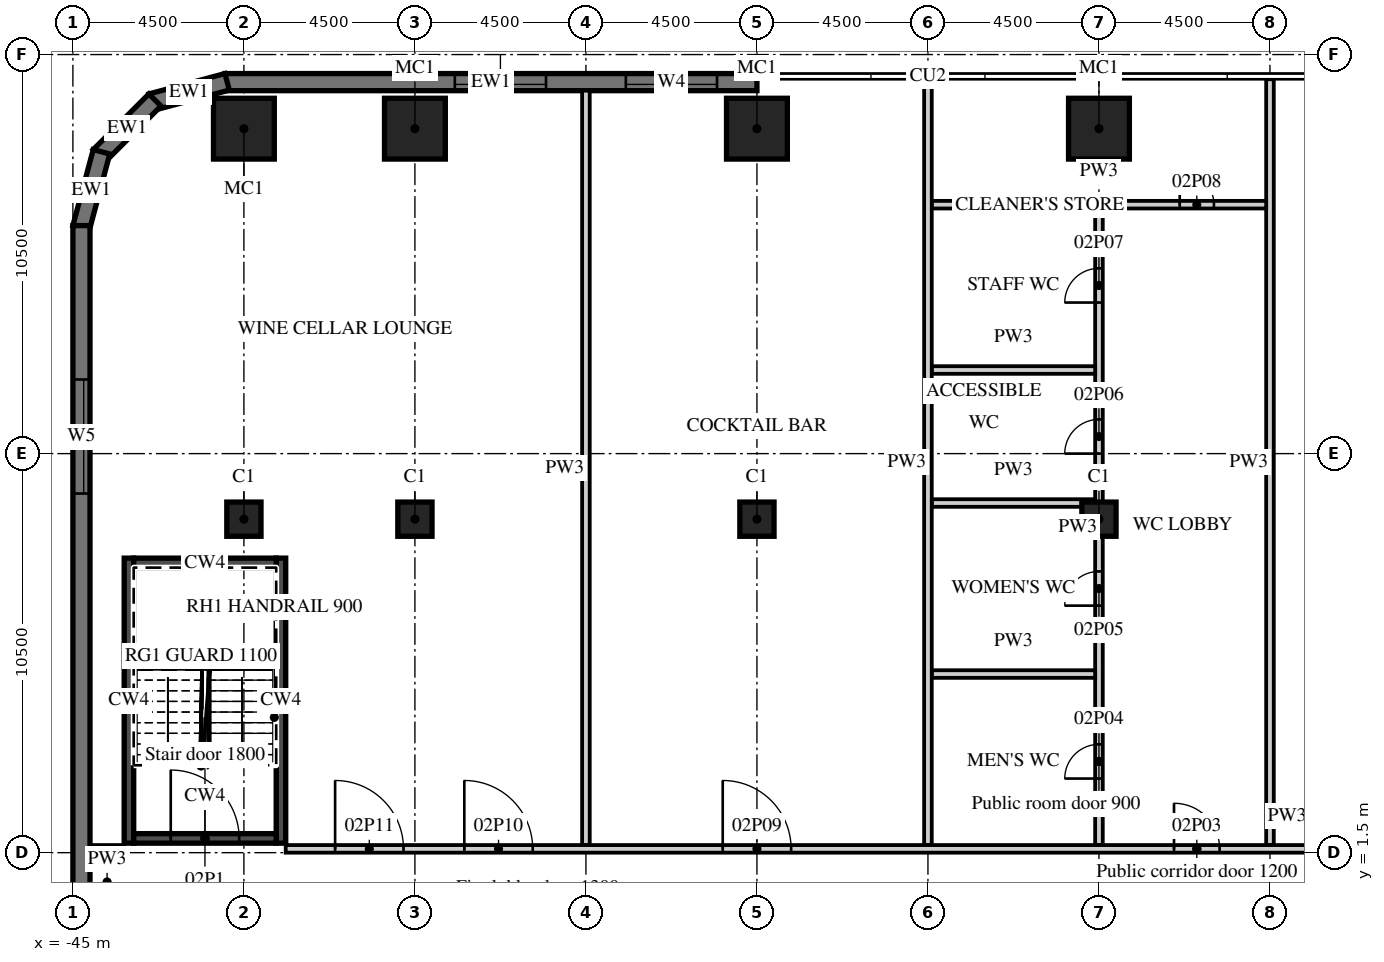
"""IFC4 building model, lengths in metres.
Left out: names, types, materials, properties, quantities, classifications, styles, units other than length and angle.
Written with IfcOpenShell. Run it as: python <this file> out.ifc"""

import sys

from ifc_helpers import new_model, si_unit, direction, frame, frame_2d, origin, origin_2d, place, context, subcontext, project, spatial, polyline, rectangle, outline, extrude, element, fill, save


model = new_model("IFC4")
c1 = context("Model", 3, precision=1e-05, world=origin(), true_north=direction((0.0, 1.0)))
c2 = subcontext(c1, "Body", "Model", "MODEL_VIEW")
j1 = project(units=[si_unit("LENGTHUNIT", "METRE"), si_unit("PLANEANGLEUNIT", "RADIAN")], contexts=[c1])
p1 = place(None, origin())
s1 = spatial("IfcSite", under=j1, at=p1, CompositionType="ELEMENT")
p2 = place(p1, origin())
s2 = spatial("IfcBuilding", under=s1, at=p2, CompositionType="ELEMENT")
p3 = place(p2, frame((0.0, 0.0, 17.0)))
s3 = spatial("IfcBuildingStorey", under=s2, at=p3, CompositionType="ELEMENT", Elevation=17.0)
for number, where, z_axis, x_axis in (
    (1, (-40.5, 20.55, 0.0), (0.0, 0.0, 1.0), (1.0, 0.0, 0.0)),
    (2, (-36.0, 20.55, 0.0), (0.0, 0.0, 1.0), (1.0, 0.0, 0.0)),
    (3, (-27.0, 20.55, 0.0), (0.0, 0.0, 1.0), (1.0, 0.0, 0.0)),
    (4, (-18.0, 20.55, 0.0), (0.0, 0.0, 1.0), (1.0, 0.0, 0.0)),
):
    element("IfcColumn", number, at=place(p3, frame(where, z_axis=z_axis, x_axis=x_axis)), inside=s3, PredefinedType="COLUMN", context=c2, shape_type="SweptSolid", body=[
        extrude(rectangle(XDim=1.6, YDim=1.6, at=origin_2d()), origin(), (0.0, 0.0, 1.0), 6.5),
    ])
for number, where, z_axis, x_axis in (
    (5, (-40.5, 10.275, 0.0), (0.0, 0.0, 1.0), (1.0, 0.0, 0.0)),
    (6, (-36.0, 10.275, 0.0), (0.0, 0.0, 1.0), (1.0, 0.0, 0.0)),
    (7, (-27.0, 10.275, 0.0), (0.0, 0.0, 1.0), (1.0, 0.0, 0.0)),
    (8, (-18.0, 10.275, 0.0), (0.0, 0.0, 1.0), (1.0, 0.0, 0.0)),
):
    element("IfcColumn", number, at=place(p3, frame(where, z_axis=z_axis, x_axis=x_axis)), inside=s3, PredefinedType="COLUMN", context=c2, shape_type="SweptSolid", body=[
        extrude(rectangle(XDim=0.9, YDim=0.9, at=origin_2d()), origin(), (0.0, 0.0, 1.0), 6.5),
    ])
p4 = place(p3, frame((-27.0, 21.775, 0.0), z_axis=(0.0, 0.0, 1.0), x_axis=(-1.0, 0.0, 0.0)))
e9 = element("IfcWall", 9, at=p4, inside=s3, PredefinedType="SOLIDWALL", context=c2, shape_type="SweptSolid", body=[
    extrude(rectangle(XDim=14.0, YDim=0.45, at=frame_2d((7.0, 0.0))), origin(), (0.0, 0.0, 1.0), 6.05),
])
p5 = place(p4, frame((1.05, 0.0, 0.9)))
e10 = element("IfcOpeningElement", 10, at=p5, cuts=e9, PredefinedType="OPENING", context=c2, shape_type="SweptSolid", body=[
    extrude(rectangle(XDim=2.4, YDim=1.8, at=frame_2d((1.2, 0.9))), frame((0.0, 0.235, 0.0), z_axis=(0.0, -1.0, 0.0), x_axis=(1.0, 0.0, 0.0)), (0.0, 0.0, 1.0), 0.47),
])
p6 = place(p4, frame((5.55, 0.0, 0.9)))
e11 = element("IfcOpeningElement", 11, at=p6, cuts=e9, PredefinedType="OPENING", context=c2, shape_type="SweptSolid", body=[
    extrude(rectangle(XDim=2.4, YDim=1.8, at=frame_2d((1.2, 0.9))), frame((0.0, 0.235, 0.0), z_axis=(0.0, -1.0, 0.0), x_axis=(1.0, 0.0, 0.0)), (0.0, 0.0, 1.0), 0.47),
])
p7 = place(p3, frame((-40.942, 21.783, 0.0), z_axis=(0.0, 0.0, 1.0), x_axis=(-0.965926999034, -0.25881466832, 0.0)))
e12 = element("IfcWall", 12, at=p7, inside=s3, PredefinedType="SOLIDWALL", context=c2, shape_type="SweptSolid", body=[
    extrude(outline(polyline([(0.0, -0.225), (2.071, -0.225), (1.95, 0.225), (0.121, 0.225), (0.0, -0.225)])), origin(), (0.0, 0.0, 1.0), 6.05),
])
p8 = place(p3, frame((-42.841, 21.305, 0.0), z_axis=(0.0, 0.0, 1.0), x_axis=(-0.707106781187, -0.707106781187, 0.0)))
e13 = element("IfcWall", 13, at=p8, inside=s3, PredefinedType="SOLIDWALL", context=c2, shape_type="SweptSolid", body=[
    extrude(outline(polyline([(0.0, -0.225), (2.071, -0.225), (1.95, 0.225), (0.121, 0.225), (0.0, -0.225)])), origin(), (0.0, 0.0, 1.0), 6.05),
])
p9 = place(p3, frame((-44.247, 19.942, 0.0), z_axis=(0.0, 0.0, 1.0), x_axis=(-0.25881466832, -0.965926999034, 0.0)))
e14 = element("IfcWall", 14, at=p9, inside=s3, PredefinedType="SOLIDWALL", context=c2, shape_type="SweptSolid", body=[
    extrude(outline(polyline([(-0.0, -0.225), (2.07, -0.225), (1.95, 0.225), (0.12, 0.225), (-0.0, -0.225)])), origin(), (0.0, 0.0, 1.0), 6.05),
])
p10 = place(p3, frame((-44.775, 18.0, 0.0), z_axis=(0.0, 0.0, 1.0), x_axis=(0.0, -1.0, 0.0)))
e15 = element("IfcWall", 15, at=p10, inside=s3, PredefinedType="SOLIDWALL", context=c2, shape_type="SweptSolid", body=[
    extrude(rectangle(XDim=36.0, YDim=0.45, at=frame_2d((18.0, 0.0))), origin(), (0.0, 0.0, 1.0), 6.05),
])
p11 = place(p10, frame((4.05, 0.0, 0.9)))
e16 = element("IfcOpeningElement", 16, at=p11, cuts=e15, PredefinedType="OPENING", context=c2, shape_type="SweptSolid", body=[
    extrude(rectangle(XDim=3.0, YDim=1.8, at=frame_2d((1.5, 0.9))), frame((0.0, 0.235, 0.0), z_axis=(0.0, -1.0, 0.0), x_axis=(1.0, 0.0, 0.0)), (0.0, 0.0, 1.0), 0.47),
])
for number, where, z_axis, x_axis in (
    (17, (-43.525, 1.75, 0.0), (0.0, 0.0, 1.0), (0.0, 1.0, 0.0)),
    (18, (-39.525, 1.75, 0.0), (0.0, 0.0, 1.0), (0.0, 1.0, 0.0)),
):
    element("IfcWall", number, at=place(p3, frame(where, z_axis=z_axis, x_axis=x_axis)), inside=s3, PredefinedType="SHEAR", context=c2, shape_type="SweptSolid", body=[
        extrude(rectangle(XDim=7.5, YDim=0.25, at=frame_2d((3.75, 0.0))), origin(), (0.0, 0.0, 1.0), 6.05),
    ])
p12 = place(p3, frame((-43.4, 9.125, 0.0), z_axis=(0.0, 0.0, 1.0), x_axis=(1.0, 0.0, 0.0)))
e19 = element("IfcWall", 19, at=p12, inside=s3, PredefinedType="SHEAR", context=c2, shape_type="SweptSolid", body=[
    extrude(rectangle(XDim=3.75, YDim=0.25, at=frame_2d((1.875, 0.0))), origin(), (0.0, 0.0, 1.0), 6.05),
])
p13 = place(p3, frame((-43.4, 1.875, 0.0), z_axis=(0.0, 0.0, 1.0), x_axis=(1.0, 0.0, 0.0)))
e20 = element("IfcWall", 20, at=p13, inside=s3, PredefinedType="SHEAR", context=c2, shape_type="SweptSolid", body=[
    extrude(rectangle(XDim=3.75, YDim=0.25, at=frame_2d((1.875, 0.0))), origin(), (0.0, 0.0, 1.0), 6.05),
])
p14 = place(p13, frame((0.975, 0.0, 0.0)))
e21 = element("IfcOpeningElement", 21, at=p14, cuts=e20, PredefinedType="OPENING", context=c2, shape_type="SweptSolid", body=[
    extrude(rectangle(XDim=1.8, YDim=2.1, at=frame_2d((0.9, 1.05))), frame((0.0, 0.135, 0.0), z_axis=(0.0, -1.0, 0.0), x_axis=(1.0, 0.0, 0.0)), (0.0, 0.0, 1.0), 0.27),
])
p15 = place(p3, frame((-13.5, 1.7, 0.0), z_axis=(0.0, 0.0, 1.0), x_axis=(0.0, 1.0, 0.0)))
e22 = element("IfcWall", 22, at=p15, inside=s3, PredefinedType="PARTITIONING", context=c2, shape_type="SweptSolid", body=[
    extrude(rectangle(XDim=20.15, YDim=0.2, at=frame_2d((10.075, 0.0))), origin(), (0.0, 0.0, 1.0), 6.05),
])
p16 = place(p3, frame((-18.0, 1.7, 0.0), z_axis=(0.0, 0.0, 1.0), x_axis=(0.0, 1.0, 0.0)))
e23 = element("IfcWall", 23, at=p16, inside=s3, PredefinedType="PARTITIONING", context=c2, shape_type="SweptSolid", body=[
    extrude(rectangle(XDim=16.75, YDim=0.2, at=frame_2d((8.375, 0.0))), origin(), (0.0, 0.0, 1.0), 6.05),
])
p17 = place(p16, frame((1.75, 0.0, 0.0)))
e24 = element("IfcOpeningElement", 24, at=p17, cuts=e23, PredefinedType="OPENING", context=c2, shape_type="SweptSolid", body=[
    extrude(rectangle(XDim=0.9, YDim=2.1, at=frame_2d((0.45, 1.05))), frame((0.0, 0.11, 0.0), z_axis=(0.0, -1.0, 0.0), x_axis=(1.0, 0.0, 0.0)), (0.0, 0.0, 1.0), 0.22),
])
p18 = place(p16, frame((6.3, 0.0, 0.0)))
e25 = element("IfcOpeningElement", 25, at=p18, cuts=e23, PredefinedType="OPENING", context=c2, shape_type="SweptSolid", body=[
    extrude(rectangle(XDim=0.9, YDim=2.1, at=frame_2d((0.45, 1.05))), frame((0.0, 0.11, 0.0), z_axis=(0.0, -1.0, 0.0), x_axis=(1.0, 0.0, 0.0)), (0.0, 0.0, 1.0), 0.22),
])
p19 = place(p16, frame((10.3, 0.0, 0.0)))
e26 = element("IfcOpeningElement", 26, at=p19, cuts=e23, PredefinedType="OPENING", context=c2, shape_type="SweptSolid", body=[
    extrude(rectangle(XDim=0.9, YDim=2.1, at=frame_2d((0.45, 1.05))), frame((0.0, 0.11, 0.0), z_axis=(0.0, -1.0, 0.0), x_axis=(1.0, 0.0, 0.0)), (0.0, 0.0, 1.0), 0.22),
])
p20 = place(p16, frame((14.275, 0.0, 0.0)))
e27 = element("IfcOpeningElement", 27, at=p20, cuts=e23, PredefinedType="OPENING", context=c2, shape_type="SweptSolid", body=[
    extrude(rectangle(XDim=0.9, YDim=2.1, at=frame_2d((0.45, 1.05))), frame((0.0, 0.11, 0.0), z_axis=(0.0, -1.0, 0.0), x_axis=(1.0, 0.0, 0.0)), (0.0, 0.0, 1.0), 0.22),
])
for number, where, z_axis, x_axis in (
    (28, (-22.4, 6.2, 0.0), (0.0, 0.0, 1.0), (1.0, 0.0, 0.0)),
    (29, (-22.4, 10.7, 0.0), (0.0, 0.0, 1.0), (1.0, 0.0, 0.0)),
    (30, (-22.4, 14.2, 0.0), (0.0, 0.0, 1.0), (1.0, 0.0, 0.0)),
):
    element("IfcWall", number, at=place(p3, frame(where, z_axis=z_axis, x_axis=x_axis)), inside=s3, PredefinedType="PARTITIONING", context=c2, shape_type="SweptSolid", body=[
        extrude(rectangle(XDim=4.3, YDim=0.2, at=frame_2d((2.15, 0.0))), origin(), (0.0, 0.0, 1.0), 6.05),
    ])
p21 = place(p3, frame((-22.4, 18.55, 0.0), z_axis=(0.0, 0.0, 1.0), x_axis=(1.0, 0.0, 0.0)))
e31 = element("IfcWall", 31, at=p21, inside=s3, PredefinedType="PARTITIONING", context=c2, shape_type="SweptSolid", body=[
    extrude(rectangle(XDim=8.8, YDim=0.2, at=frame_2d((4.4, 0.0))), origin(), (0.0, 0.0, 1.0), 6.05),
])
p22 = place(p21, frame((6.525, 0.0, 0.0)))
e32 = element("IfcOpeningElement", 32, at=p22, cuts=e31, PredefinedType="OPENING", context=c2, shape_type="SweptSolid", body=[
    extrude(rectangle(XDim=0.9, YDim=2.1, at=frame_2d((0.45, 1.05))), frame((0.0, 0.11, 0.0), z_axis=(0.0, -1.0, 0.0), x_axis=(1.0, 0.0, 0.0)), (0.0, 0.0, 1.0), 0.22),
])
p23 = place(p3, frame((-22.5, 1.7, 0.0), z_axis=(0.0, 0.0, 1.0), x_axis=(0.0, 1.0, 0.0)))
e33 = element("IfcWall", 33, at=p23, inside=s3, PredefinedType="PARTITIONING", context=c2, shape_type="SweptSolid", body=[
    extrude(rectangle(XDim=20.15, YDim=0.2, at=frame_2d((10.075, 0.0))), origin(), (0.0, 0.0, 1.0), 6.05),
])
p24 = place(p3, frame((-31.5, 1.7, 0.0), z_axis=(0.0, 0.0, 1.0), x_axis=(0.0, 1.0, 0.0)))
e34 = element("IfcWall", 34, at=p24, inside=s3, PredefinedType="PARTITIONING", context=c2, shape_type="SweptSolid", body=[
    extrude(rectangle(XDim=19.85, YDim=0.2, at=frame_2d((9.925, 0.0))), origin(), (0.0, 0.0, 1.0), 6.05),
])
p25 = place(p3, frame((-39.4, 1.6, 0.0), z_axis=(0.0, 0.0, 1.0), x_axis=(1.0, 0.0, 0.0)))
e35 = element("IfcWall", 35, at=p25, inside=s3, PredefinedType="PARTITIONING", context=c2, shape_type="SweptSolid", body=[
    extrude(rectangle(XDim=52.7, YDim=0.2, at=frame_2d((26.35, 0.0))), origin(), (0.0, 0.0, 1.0), 6.05),
])
p26 = place(p25, frame((43.79, 0.0, 0.0)))
e36 = element("IfcOpeningElement", 36, at=p26, cuts=e35, PredefinedType="OPENING", context=c2, shape_type="SweptSolid", body=[
    extrude(rectangle(XDim=1.8, YDim=2.1, at=frame_2d((0.9, 1.05))), frame((0.0, 0.11, 0.0), z_axis=(0.0, -1.0, 0.0), x_axis=(1.0, 0.0, 0.0)), (0.0, 0.0, 1.0), 0.22),
])
p27 = place(p25, frame((33.11, 0.0, 0.0)))
e37 = element("IfcOpeningElement", 37, at=p27, cuts=e35, PredefinedType="OPENING", context=c2, shape_type="SweptSolid", body=[
    extrude(rectangle(XDim=1.8, YDim=2.1, at=frame_2d((0.9, 1.05))), frame((0.0, 0.11, 0.0), z_axis=(0.0, -1.0, 0.0), x_axis=(1.0, 0.0, 0.0)), (0.0, 0.0, 1.0), 0.22),
])
p28 = place(p25, frame((23.375, 0.0, 0.0)))
e38 = element("IfcOpeningElement", 38, at=p28, cuts=e35, PredefinedType="OPENING", context=c2, shape_type="SweptSolid", body=[
    extrude(rectangle(XDim=1.2, YDim=2.1, at=frame_2d((0.6, 1.05))), frame((0.0, 0.11, 0.0), z_axis=(0.0, -1.0, 0.0), x_axis=(1.0, 0.0, 0.0)), (0.0, 0.0, 1.0), 0.22),
])
p29 = place(p25, frame((11.5, 0.0, 0.0)))
e39 = element("IfcOpeningElement", 39, at=p29, cuts=e35, PredefinedType="OPENING", context=c2, shape_type="SweptSolid", body=[
    extrude(rectangle(XDim=1.8, YDim=2.1, at=frame_2d((0.9, 1.05))), frame((0.0, 0.11, 0.0), z_axis=(0.0, -1.0, 0.0), x_axis=(1.0, 0.0, 0.0)), (0.0, 0.0, 1.0), 0.22),
])
p30 = place(p25, frame((4.7, 0.0, 0.0)))
e40 = element("IfcOpeningElement", 40, at=p30, cuts=e35, PredefinedType="OPENING", context=c2, shape_type="SweptSolid", body=[
    extrude(rectangle(XDim=1.8, YDim=2.1, at=frame_2d((0.9, 1.05))), frame((0.0, 0.11, 0.0), z_axis=(0.0, -1.0, 0.0), x_axis=(1.0, 0.0, 0.0)), (0.0, 0.0, 1.0), 0.22),
])
p31 = place(p25, frame((1.3, 0.0, 0.0)))
e41 = element("IfcOpeningElement", 41, at=p31, cuts=e35, PredefinedType="OPENING", context=c2, shape_type="SweptSolid", body=[
    extrude(rectangle(XDim=1.8, YDim=2.1, at=frame_2d((0.9, 1.05))), frame((0.0, 0.11, 0.0), z_axis=(0.0, -1.0, 0.0), x_axis=(1.0, 0.0, 0.0)), (0.0, 0.0, 1.0), 0.22),
])
p32 = place(p3, frame((-44.55, 1.6, 0.0), z_axis=(0.0, 0.0, 1.0), x_axis=(1.0, 0.0, 0.0)))
e42 = element("IfcWall", 42, at=p32, inside=s3, PredefinedType="PARTITIONING", context=c2, shape_type="SweptSolid", body=[
    extrude(rectangle(XDim=0.9, YDim=0.2, at=frame_2d((0.45, 0.0))), origin(), (0.0, 0.0, 1.0), 6.05),
])
p33 = place(p5, origin())
e43 = element("IfcWindow", 43, at=p33, inside=s3, PartitioningType="SINGLE_PANEL", PredefinedType="WINDOW", context=c2, shape_type="SweptSolid", body=[
    extrude(rectangle(XDim=2.4, YDim=1.8, at=frame_2d((1.2, 0.9))), frame((0.0, 0.09, 0.0), z_axis=(0.0, -1.0, 0.0), x_axis=(1.0, 0.0, 0.0)), (0.0, 0.0, 1.0), 0.06),
])
fill(e10, e43)
p34 = place(p6, origin())
e44 = element("IfcWindow", 44, at=p34, inside=s3, PartitioningType="SINGLE_PANEL", PredefinedType="WINDOW", context=c2, shape_type="SweptSolid", body=[
    extrude(rectangle(XDim=2.4, YDim=1.8, at=frame_2d((1.2, 0.9))), frame((0.0, 0.09, 0.0), z_axis=(0.0, -1.0, 0.0), x_axis=(1.0, 0.0, 0.0)), (0.0, 0.0, 1.0), 0.06),
])
fill(e11, e44)
p35 = place(p11, origin())
e45 = element("IfcWindow", 45, at=p35, inside=s3, PartitioningType="SINGLE_PANEL", PredefinedType="WINDOW", context=c2, shape_type="SweptSolid", body=[
    extrude(rectangle(XDim=3.0, YDim=1.8, at=frame_2d((1.5, 0.9))), frame((0.0, 0.09, 0.0), z_axis=(0.0, -1.0, 0.0), x_axis=(1.0, 0.0, 0.0)), (0.0, 0.0, 1.0), 0.06),
])
fill(e16, e45)
p36 = place(p14, origin())
e46 = element("IfcDoor", 46, at=p36, inside=s3, OperationType="DOUBLE_DOOR_DOUBLE_SWING", PredefinedType="DOOR", context=c2, shape_type="SweptSolid", body=[
    extrude(rectangle(XDim=1.8, YDim=2.1, at=frame_2d((0.9, 1.05))), frame((0.0, 0.025, 0.0), z_axis=(0.0, -1.0, 0.0), x_axis=(1.0, 0.0, 0.0)), (0.0, 0.0, 1.0), 0.05),
])
fill(e21, e46)
p37 = place(p28, origin())
e47 = element("IfcDoor", 47, at=p37, inside=s3, OperationType="SINGLE_SWING_LEFT", PredefinedType="DOOR", context=c2, shape_type="SweptSolid", body=[
    extrude(rectangle(XDim=1.2, YDim=2.1, at=frame_2d((0.6, 1.05))), frame((0.0, 0.025, 0.0), z_axis=(0.0, -1.0, 0.0), x_axis=(1.0, 0.0, 0.0)), (0.0, 0.0, 1.0), 0.05),
])
fill(e38, e47)
p38 = place(p17, origin())
e48 = element("IfcDoor", 48, at=p38, inside=s3, OperationType="SINGLE_SWING_LEFT", PredefinedType="DOOR", context=c2, shape_type="SweptSolid", body=[
    extrude(rectangle(XDim=0.9, YDim=2.1, at=frame_2d((0.45, 1.05))), frame((0.0, 0.025, 0.0), z_axis=(0.0, -1.0, 0.0), x_axis=(1.0, 0.0, 0.0)), (0.0, 0.0, 1.0), 0.05),
])
fill(e24, e48)
p39 = place(p18, origin())
e49 = element("IfcDoor", 49, at=p39, inside=s3, OperationType="SINGLE_SWING_LEFT", PredefinedType="DOOR", context=c2, shape_type="SweptSolid", body=[
    extrude(rectangle(XDim=0.9, YDim=2.1, at=frame_2d((0.45, 1.05))), frame((0.0, 0.025, 0.0), z_axis=(0.0, -1.0, 0.0), x_axis=(1.0, 0.0, 0.0)), (0.0, 0.0, 1.0), 0.05),
])
fill(e25, e49)
p40 = place(p19, origin())
e50 = element("IfcDoor", 50, at=p40, inside=s3, OperationType="SINGLE_SWING_LEFT", PredefinedType="DOOR", context=c2, shape_type="SweptSolid", body=[
    extrude(rectangle(XDim=0.9, YDim=2.1, at=frame_2d((0.45, 1.05))), frame((0.0, 0.025, 0.0), z_axis=(0.0, -1.0, 0.0), x_axis=(1.0, 0.0, 0.0)), (0.0, 0.0, 1.0), 0.05),
])
fill(e26, e50)
p41 = place(p20, origin())
e51 = element("IfcDoor", 51, at=p41, inside=s3, OperationType="SINGLE_SWING_LEFT", PredefinedType="DOOR", context=c2, shape_type="SweptSolid", body=[
    extrude(rectangle(XDim=0.9, YDim=2.1, at=frame_2d((0.45, 1.05))), frame((0.0, 0.025, 0.0), z_axis=(0.0, -1.0, 0.0), x_axis=(1.0, 0.0, 0.0)), (0.0, 0.0, 1.0), 0.05),
])
fill(e27, e51)
p42 = place(p22, origin())
e52 = element("IfcDoor", 52, at=p42, inside=s3, OperationType="SINGLE_SWING_LEFT", PredefinedType="DOOR", context=c2, shape_type="SweptSolid", body=[
    extrude(rectangle(XDim=0.9, YDim=2.1, at=frame_2d((0.45, 1.05))), frame((0.0, 0.025, 0.0), z_axis=(0.0, -1.0, 0.0), x_axis=(1.0, 0.0, 0.0)), (0.0, 0.0, 1.0), 0.05),
])
fill(e32, e52)
p43 = place(p29, origin())
e53 = element("IfcDoor", 53, at=p43, inside=s3, OperationType="DOUBLE_DOOR_DOUBLE_SWING", PredefinedType="DOOR", context=c2, shape_type="SweptSolid", body=[
    extrude(rectangle(XDim=1.8, YDim=2.1, at=frame_2d((0.9, 1.05))), frame((0.0, 0.025, 0.0), z_axis=(0.0, -1.0, 0.0), x_axis=(1.0, 0.0, 0.0)), (0.0, 0.0, 1.0), 0.05),
])
fill(e39, e53)
p44 = place(p30, origin())
e54 = element("IfcDoor", 54, at=p44, inside=s3, OperationType="DOUBLE_DOOR_DOUBLE_SWING", PredefinedType="DOOR", context=c2, shape_type="SweptSolid", body=[
    extrude(rectangle(XDim=1.8, YDim=2.1, at=frame_2d((0.9, 1.05))), frame((0.0, 0.025, 0.0), z_axis=(0.0, -1.0, 0.0), x_axis=(1.0, 0.0, 0.0)), (0.0, 0.0, 1.0), 0.05),
])
fill(e40, e54)
p45 = place(p31, origin())
e55 = element("IfcDoor", 55, at=p45, inside=s3, OperationType="DOUBLE_DOOR_DOUBLE_SWING", PredefinedType="DOOR", context=c2, shape_type="SweptSolid", body=[
    extrude(rectangle(XDim=1.8, YDim=2.1, at=frame_2d((0.9, 1.05))), frame((0.0, 0.025, 0.0), z_axis=(0.0, -1.0, 0.0), x_axis=(1.0, 0.0, 0.0)), (0.0, 0.0, 1.0), 0.05),
])
fill(e41, e55)
save(model, sys.argv[1])
